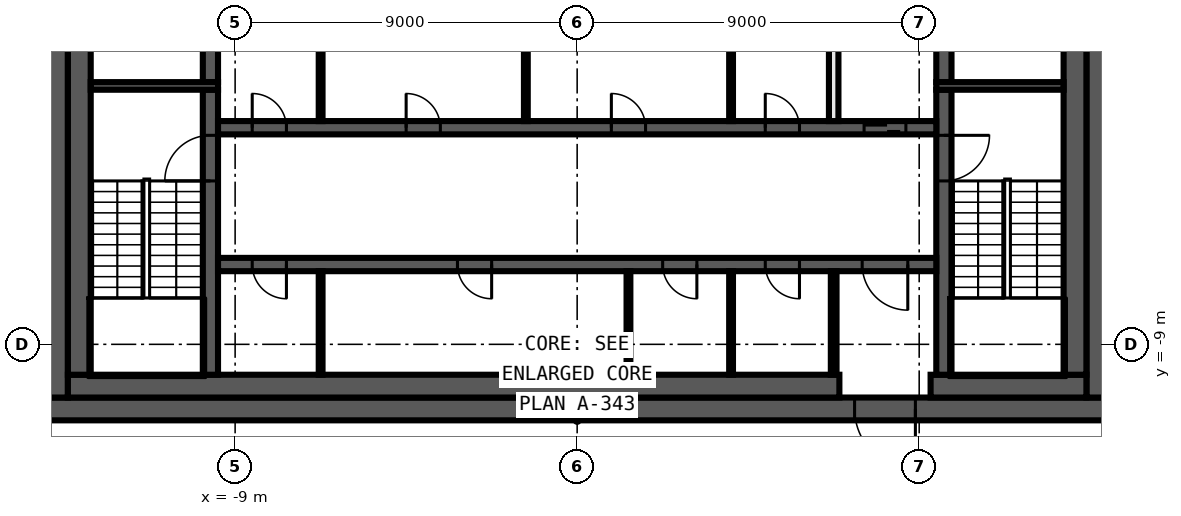
"""IFC4 building model, lengths in metres.
Left out: names, types, materials, properties, quantities, classifications, styles, units other than length and angle.
Written with IfcOpenShell. Run it as: python <this file> out.ifc"""

import sys

from ifc_helpers import new_model, si_unit, direction, frame, frame_2d, origin, place, context, subcontext, project, spatial, rectangle, extrude, element, fill, save


model = new_model("IFC4")
c1 = context("Model", 3, precision=1e-05, world=origin(), true_north=direction((0.0, 1.0)))
c2 = subcontext(c1, "Body", "Model", "MODEL_VIEW")
j1 = project(units=[si_unit("LENGTHUNIT", "METRE"), si_unit("PLANEANGLEUNIT", "RADIAN")], contexts=[c1])
p1 = place(None, origin())
s1 = spatial("IfcSite", under=j1, at=p1, CompositionType="ELEMENT")
p2 = place(p1, origin())
s2 = spatial("IfcBuilding", under=s1, at=p2, CompositionType="ELEMENT")
p3 = place(p2, frame((0.0, 0.0, 367.4)))
s3 = spatial("IfcBuildingStorey", under=s2, at=p3, CompositionType="ELEMENT", Elevation=367.4)
p4 = place(p3, frame((11.367, -20.469, 0.0), z_axis=(0.0, 0.0, 1.0), x_axis=(0.424125024155, 0.905603646131, 0.0)))
e1 = element("IfcWall", 1, at=p4, inside=s3, PredefinedType="SOLIDWALL", context=c2, shape_type="SweptSolid", body=[
    extrude(rectangle(XDim=28.801, YDim=0.25, at=frame_2d((14.401, 0.0))), origin(), (0.0, 0.0, 1.0), 3.8),
])
p5 = place(p3, frame((-11.138, 20.28, 0.0), z_axis=(0.0, 0.0, 1.0), x_axis=(-0.441342255748, -0.897338850876, 0.0)))
e2 = element("IfcWall", 2, at=p5, inside=s3, PredefinedType="SOLIDWALL", context=c2, shape_type="SweptSolid", body=[
    extrude(rectangle(XDim=28.805, YDim=0.25, at=frame_2d((14.403, 0.0))), origin(), (0.0, 0.0, 1.0), 3.8),
])
p6 = place(p3, frame((-23.851, -5.568, 0.0), z_axis=(0.0, 0.0, 1.0), x_axis=(0.701718568407, -0.712454244673, 0.0)))
e3 = element("IfcWall", 3, at=p6, inside=s3, PredefinedType="SOLIDWALL", context=c2, shape_type="SweptSolid", body=[
    extrude(rectangle(XDim=20.785, YDim=0.25, at=frame_2d((10.393, 0.0))), origin(), (0.0, 0.0, 1.0), 3.8),
])
p7 = place(p3, frame((14.0, -10.7, 0.0), z_axis=(0.0, 0.0, 1.0), x_axis=(-1.0, 0.0, 0.0)))
e4 = element("IfcWall", 4, at=p7, inside=s3, PredefinedType="SHEAR", context=c2, shape_type="SweptSolid", body=[
    extrude(rectangle(XDim=28.0, YDim=0.6, at=frame_2d((14.0, 0.0))), origin(), (0.0, 0.0, 1.0), 3.8),
])
p8 = place(p7, frame((5.1, 0.0, 0.0)))
e5 = element("IfcOpeningElement", 5, at=p8, cuts=e4, PredefinedType="OPENING", context=c2, shape_type="SweptSolid", body=[
    extrude(rectangle(XDim=1.6, YDim=2.1, at=frame_2d((0.8, 1.05))), frame((0.0, 0.31, 0.0), z_axis=(0.0, -1.0, 0.0), x_axis=(1.0, 0.0, 0.0)), (0.0, 0.0, 1.0), 0.62),
])
for number, where, z_axis, x_axis in (
    (6, (13.7, 10.4, 0.0), (0.0, 0.0, 1.0), (0.0, -1.0, 0.0)),
    (7, (-13.7, -10.4, 0.0), (0.0, 0.0, 1.0), (0.0, 1.0, 0.0)),
):
    element("IfcWall", number, at=place(p3, frame(where, z_axis=z_axis, x_axis=x_axis)), inside=s3, PredefinedType="SHEAR", context=c2, shape_type="SweptSolid", body=[
        extrude(rectangle(XDim=20.8, YDim=0.6, at=frame_2d((10.4, 0.0))), origin(), (0.0, 0.0, 1.0), 3.8),
    ])
p9 = place(p3, frame((13.4, -10.1, 0.0), z_axis=(0.0, 0.0, 1.0), x_axis=(-1.0, 0.0, 0.0)))
e8 = element("IfcWall", 8, at=p9, inside=s3, PredefinedType="SHEAR", context=c2, shape_type="SweptSolid", body=[
    extrude(rectangle(XDim=4.1, YDim=0.6, at=frame_2d((2.05, 0.0))), origin(), (0.0, 0.0, 1.0), 3.8),
])
p10 = place(p3, frame((6.9, -10.1, 0.0), z_axis=(0.0, 0.0, 1.0), x_axis=(-1.0, 0.0, 0.0)))
e9 = element("IfcWall", 9, at=p10, inside=s3, PredefinedType="SHEAR", context=c2, shape_type="SweptSolid", body=[
    extrude(rectangle(XDim=20.3, YDim=0.6, at=frame_2d((10.15, 0.0))), origin(), (0.0, 0.0, 1.0), 3.8),
])
for number, where, z_axis, x_axis in (
    (10, (13.1, 9.8, 0.0), (0.0, 0.0, 1.0), (0.0, -1.0, 0.0)),
    (11, (-13.1, -9.8, 0.0), (0.0, 0.0, 1.0), (0.0, 1.0, 0.0)),
):
    element("IfcWall", number, at=place(p3, frame(where, z_axis=z_axis, x_axis=x_axis)), inside=s3, PredefinedType="SHEAR", context=c2, shape_type="SweptSolid", body=[
        extrude(rectangle(XDim=19.6, YDim=0.6, at=frame_2d((9.8, 0.0))), origin(), (0.0, 0.0, 1.0), 3.8),
    ])
p11 = place(p3, frame((9.65, -2.3, 0.0), z_axis=(0.0, 0.0, 1.0), x_axis=(0.0, -1.0, 0.0)))
e12 = element("IfcWall", 12, at=p11, inside=s3, PredefinedType="SHEAR", context=c2, shape_type="SweptSolid", body=[
    extrude(rectangle(XDim=7.5, YDim=0.4, at=frame_2d((3.75, 0.0))), origin(), (0.0, 0.0, 1.0), 3.8),
])
p12 = place(p11, frame((1.2, 0.0, 0.0)))
e13 = element("IfcOpeningElement", 13, at=p12, cuts=e12, PredefinedType="OPENING", context=c2, shape_type="SweptSolid", body=[
    extrude(rectangle(XDim=1.2, YDim=2.1, at=frame_2d((0.6, 1.05))), frame((0.0, 0.21, 0.0), z_axis=(0.0, -1.0, 0.0), x_axis=(1.0, 0.0, 0.0)), (0.0, 0.0, 1.0), 0.42),
])
p13 = place(p3, frame((9.65, 2.1, 0.0), z_axis=(0.0, 0.0, 1.0), x_axis=(0.0, -1.0, 0.0)))
e14 = element("IfcWall", 14, at=p13, inside=s3, PredefinedType="SHEAR", context=c2, shape_type="SweptSolid", body=[
    extrude(rectangle(XDim=4.2, YDim=0.4, at=frame_2d((2.1, 0.0))), origin(), (0.0, 0.0, 1.0), 3.8),
])
p14 = place(p13, frame((0.15, 0.0, 0.0)))
e15 = element("IfcOpeningElement", 15, at=p14, cuts=e14, PredefinedType="OPENING", context=c2, shape_type="SweptSolid", body=[
    extrude(rectangle(XDim=0.9, YDim=2.1, at=frame_2d((0.45, 1.05))), frame((0.0, 0.21, 0.0), z_axis=(0.0, -1.0, 0.0), x_axis=(1.0, 0.0, 0.0)), (0.0, 0.0, 1.0), 0.42),
])
p15 = place(p3, frame((-9.65, -9.8, 0.0), z_axis=(0.0, 0.0, 1.0), x_axis=(0.0, 1.0, 0.0)))
e16 = element("IfcWall", 16, at=p15, inside=s3, PredefinedType="SHEAR", context=c2, shape_type="SweptSolid", body=[
    extrude(rectangle(XDim=7.5, YDim=0.4, at=frame_2d((3.75, 0.0))), origin(), (0.0, 0.0, 1.0), 3.8),
])
p16 = place(p15, frame((5.1, 0.0, 0.0)))
e17 = element("IfcOpeningElement", 17, at=p16, cuts=e16, PredefinedType="OPENING", context=c2, shape_type="SweptSolid", body=[
    extrude(rectangle(XDim=1.2, YDim=2.1, at=frame_2d((0.6, 1.05))), frame((0.0, 0.21, 0.0), z_axis=(0.0, -1.0, 0.0), x_axis=(1.0, 0.0, 0.0)), (0.0, 0.0, 1.0), 0.42),
])
p17 = place(p3, frame((-9.65, -2.1, 0.0), z_axis=(0.0, 0.0, 1.0), x_axis=(0.0, 1.0, 0.0)))
e18 = element("IfcWall", 18, at=p17, inside=s3, PredefinedType="SHEAR", context=c2, shape_type="SweptSolid", body=[
    extrude(rectangle(XDim=4.2, YDim=0.4, at=frame_2d((2.1, 0.0))), origin(), (0.0, 0.0, 1.0), 3.8),
])
for number, where, z_axis, x_axis in (
    (19, (9.45, -2.2, 0.0), (0.0, 0.0, 1.0), (1.0, 0.0, 0.0)),
    (20, (-9.45, -2.2, 0.0), (0.0, 0.0, 1.0), (-1.0, 0.0, 0.0)),
):
    element("IfcWall", number, at=place(p3, frame(where, z_axis=z_axis, x_axis=x_axis)), inside=s3, PredefinedType="SHEAR", context=c2, shape_type="SweptSolid", body=[
        extrude(rectangle(XDim=3.35, YDim=0.2, at=frame_2d((1.675, 0.0))), origin(), (0.0, 0.0, 1.0), 3.8),
    ])
p18 = place(p3, frame((-9.45, -3.3, 0.0), z_axis=(0.0, 0.0, 1.0), x_axis=(1.0, 0.0, 0.0)))
e21 = element("IfcWall", 21, at=p18, inside=s3, PredefinedType="SHEAR", context=c2, shape_type="SweptSolid", body=[
    extrude(rectangle(XDim=18.9, YDim=0.35, at=frame_2d((9.45, 0.0))), origin(), (0.0, 0.0, 1.0), 3.8),
])
p19 = place(p18, frame((17.0, 0.0, 0.0)))
e22 = element("IfcOpeningElement", 22, at=p19, cuts=e21, PredefinedType="OPENING", context=c2, shape_type="SweptSolid", body=[
    extrude(rectangle(XDim=1.1, YDim=2.1, at=frame_2d((0.55, 1.05))), frame((0.0, 0.185, 0.0), z_axis=(0.0, -1.0, 0.0), x_axis=(1.0, 0.0, 0.0)), (0.0, 0.0, 1.0), 0.37),
])
p20 = place(p18, frame((0.9, 0.0, 0.0)))
e23 = element("IfcOpeningElement", 23, at=p20, cuts=e21, PredefinedType="OPENING", context=c2, shape_type="SweptSolid", body=[
    extrude(rectangle(XDim=0.9, YDim=2.1, at=frame_2d((0.45, 1.05))), frame((0.0, 0.185, 0.0), z_axis=(0.0, -1.0, 0.0), x_axis=(1.0, 0.0, 0.0)), (0.0, 0.0, 1.0), 0.37),
])
p21 = place(p18, frame((4.95, 0.0, 0.0)))
e24 = element("IfcOpeningElement", 24, at=p21, cuts=e21, PredefinedType="OPENING", context=c2, shape_type="SweptSolid", body=[
    extrude(rectangle(XDim=0.9, YDim=2.1, at=frame_2d((0.45, 1.05))), frame((0.0, 0.185, 0.0), z_axis=(0.0, -1.0, 0.0), x_axis=(1.0, 0.0, 0.0)), (0.0, 0.0, 1.0), 0.37),
])
p22 = place(p18, frame((10.35, 0.0, 0.0)))
e25 = element("IfcOpeningElement", 25, at=p22, cuts=e21, PredefinedType="OPENING", context=c2, shape_type="SweptSolid", body=[
    extrude(rectangle(XDim=0.9, YDim=2.1, at=frame_2d((0.45, 1.05))), frame((0.0, 0.185, 0.0), z_axis=(0.0, -1.0, 0.0), x_axis=(1.0, 0.0, 0.0)), (0.0, 0.0, 1.0), 0.37),
])
p23 = place(p18, frame((14.4, 0.0, 0.0)))
e26 = element("IfcOpeningElement", 26, at=p23, cuts=e21, PredefinedType="OPENING", context=c2, shape_type="SweptSolid", body=[
    extrude(rectangle(XDim=0.9, YDim=2.1, at=frame_2d((0.45, 1.05))), frame((0.0, 0.185, 0.0), z_axis=(0.0, -1.0, 0.0), x_axis=(1.0, 0.0, 0.0)), (0.0, 0.0, 1.0), 0.37),
])
p24 = place(p3, frame((9.45, -6.9, 0.0), z_axis=(0.0, 0.0, 1.0), x_axis=(-1.0, 0.0, 0.0)))
e27 = element("IfcWall", 27, at=p24, inside=s3, PredefinedType="SHEAR", context=c2, shape_type="SweptSolid", body=[
    extrude(rectangle(XDim=18.9, YDim=0.35, at=frame_2d((9.45, 0.0))), origin(), (0.0, 0.0, 1.0), 3.8),
])
p25 = place(p24, frame((0.75, 0.0, 0.0)))
e28 = element("IfcOpeningElement", 28, at=p25, cuts=e27, PredefinedType="OPENING", context=c2, shape_type="SweptSolid", body=[
    extrude(rectangle(XDim=1.2, YDim=2.1, at=frame_2d((0.6, 1.05))), frame((0.0, 0.185, 0.0), z_axis=(0.0, -1.0, 0.0), x_axis=(1.0, 0.0, 0.0)), (0.0, 0.0, 1.0), 0.37),
])
p26 = place(p24, frame((17.1, 0.0, 0.0)))
e29 = element("IfcOpeningElement", 29, at=p26, cuts=e27, PredefinedType="OPENING", context=c2, shape_type="SweptSolid", body=[
    extrude(rectangle(XDim=0.9, YDim=2.1, at=frame_2d((0.45, 1.05))), frame((0.0, 0.185, 0.0), z_axis=(0.0, -1.0, 0.0), x_axis=(1.0, 0.0, 0.0)), (0.0, 0.0, 1.0), 0.37),
])
p27 = place(p24, frame((11.7, 0.0, 0.0)))
e30 = element("IfcOpeningElement", 30, at=p27, cuts=e27, PredefinedType="OPENING", context=c2, shape_type="SweptSolid", body=[
    extrude(rectangle(XDim=0.9, YDim=2.1, at=frame_2d((0.45, 1.05))), frame((0.0, 0.185, 0.0), z_axis=(0.0, -1.0, 0.0), x_axis=(1.0, 0.0, 0.0)), (0.0, 0.0, 1.0), 0.37),
])
p28 = place(p24, frame((6.3, 0.0, 0.0)))
e31 = element("IfcOpeningElement", 31, at=p28, cuts=e27, PredefinedType="OPENING", context=c2, shape_type="SweptSolid", body=[
    extrude(rectangle(XDim=0.9, YDim=2.1, at=frame_2d((0.45, 1.05))), frame((0.0, 0.185, 0.0), z_axis=(0.0, -1.0, 0.0), x_axis=(1.0, 0.0, 0.0)), (0.0, 0.0, 1.0), 0.37),
])
p29 = place(p24, frame((3.6, 0.0, 0.0)))
e32 = element("IfcOpeningElement", 32, at=p29, cuts=e27, PredefinedType="OPENING", context=c2, shape_type="SweptSolid", body=[
    extrude(rectangle(XDim=0.9, YDim=2.1, at=frame_2d((0.45, 1.05))), frame((0.0, 0.185, 0.0), z_axis=(0.0, -1.0, 0.0), x_axis=(1.0, 0.0, 0.0)), (0.0, 0.0, 1.0), 0.37),
])
p30 = place(p3, frame((6.75, -9.8, 0.0), z_axis=(0.0, 0.0, 1.0), x_axis=(0.0, 1.0, 0.0)))
e33 = element("IfcWall", 33, at=p30, inside=s3, PredefinedType="PARTITIONING", context=c2, shape_type="SweptSolid", body=[
    extrude(rectangle(XDim=2.725, YDim=0.15, at=frame_2d((1.363, 0.0))), origin(), (0.0, 0.0, 1.0), 3.8),
])
p31 = place(p3, frame((6.75, -3.125, 0.0), z_axis=(0.0, 0.0, 1.0), x_axis=(0.0, 1.0, 0.0)))
e34 = element("IfcWall", 34, at=p31, inside=s3, PredefinedType="SOLIDWALL", context=c2, shape_type="SweptSolid", body=[
    extrude(rectangle(XDim=2.725, YDim=0.25, at=frame_2d((1.363, 0.0))), origin(), (0.0, 0.0, 1.0), 3.8),
])
for number, where, z_axis, x_axis in (
    (35, (4.05, -9.8, 0.0), (0.0, 0.0, 1.0), (0.0, 1.0, 0.0)),
    (36, (4.05, -3.125, 0.0), (0.0, 0.0, 1.0), (0.0, 1.0, 0.0)),
    (37, (1.35, -9.8, 0.0), (0.0, 0.0, 1.0), (0.0, 1.0, 0.0)),
    (38, (-1.35, -3.125, 0.0), (0.0, 0.0, 1.0), (0.0, 1.0, 0.0)),
    (39, (-6.75, -9.8, 0.0), (0.0, 0.0, 1.0), (0.0, 1.0, 0.0)),
    (40, (-6.75, -3.125, 0.0), (0.0, 0.0, 1.0), (0.0, 1.0, 0.0)),
):
    element("IfcWall", number, at=place(p3, frame(where, z_axis=z_axis, x_axis=x_axis)), inside=s3, PredefinedType="PARTITIONING", context=c2, shape_type="SweptSolid", body=[
        extrude(rectangle(XDim=2.725, YDim=0.1, at=frame_2d((1.363, 0.0))), origin(), (0.0, 0.0, 1.0), 3.8),
    ])
p32 = place(p19, origin())
e41 = element("IfcDoor", 41, at=p32, inside=s3, OperationType="DOUBLE_DOOR_SLIDING", PredefinedType="DOOR", context=c2, shape_type="SweptSolid", body=[
    extrude(rectangle(XDim=1.1, YDim=2.1, at=frame_2d((0.55, 1.05))), frame((0.0, 0.025, 0.0), z_axis=(0.0, -1.0, 0.0), x_axis=(1.0, 0.0, 0.0)), (0.0, 0.0, 1.0), 0.05),
])
fill(e22, e41)
p33 = place(p8, origin())
e42 = element("IfcDoor", 42, at=p33, inside=s3, OperationType="DOUBLE_DOOR_SINGLE_SWING", PredefinedType="DOOR", context=c2, shape_type="SweptSolid", body=[
    extrude(rectangle(XDim=1.6, YDim=2.1, at=frame_2d((0.8, 1.05))), frame((0.0, 0.025, 0.0), z_axis=(0.0, -1.0, 0.0), x_axis=(1.0, 0.0, 0.0)), (0.0, 0.0, 1.0), 0.05),
])
fill(e5, e42)
p34 = place(p25, origin())
e43 = element("IfcDoor", 43, at=p34, inside=s3, OperationType="SINGLE_SWING_LEFT", PredefinedType="DOOR", context=c2, shape_type="SweptSolid", body=[
    extrude(rectangle(XDim=1.2, YDim=2.1, at=frame_2d((0.6, 1.05))), frame((0.0, 0.025, 0.0), z_axis=(0.0, -1.0, 0.0), x_axis=(1.0, 0.0, 0.0)), (0.0, 0.0, 1.0), 0.05),
])
fill(e28, e43)
p35 = place(p20, origin())
e44 = element("IfcDoor", 44, at=p35, inside=s3, OperationType="SINGLE_SWING_RIGHT", PredefinedType="DOOR", context=c2, shape_type="SweptSolid", body=[
    extrude(rectangle(XDim=0.9, YDim=2.1, at=frame_2d((0.45, 1.05))), frame((0.0, 0.025, 0.0), z_axis=(0.0, -1.0, 0.0), x_axis=(1.0, 0.0, 0.0)), (0.0, 0.0, 1.0), 0.05),
])
fill(e23, e44)
p36 = place(p21, origin())
e45 = element("IfcDoor", 45, at=p36, inside=s3, OperationType="SINGLE_SWING_LEFT", PredefinedType="DOOR", context=c2, shape_type="SweptSolid", body=[
    extrude(rectangle(XDim=0.9, YDim=2.1, at=frame_2d((0.45, 1.05))), frame((0.0, 0.025, 0.0), z_axis=(0.0, -1.0, 0.0), x_axis=(1.0, 0.0, 0.0)), (0.0, 0.0, 1.0), 0.05),
])
fill(e24, e45)
p37 = place(p22, origin())
e46 = element("IfcDoor", 46, at=p37, inside=s3, OperationType="SINGLE_SWING_RIGHT", PredefinedType="DOOR", context=c2, shape_type="SweptSolid", body=[
    extrude(rectangle(XDim=0.9, YDim=2.1, at=frame_2d((0.45, 1.05))), frame((0.0, 0.025, 0.0), z_axis=(0.0, -1.0, 0.0), x_axis=(1.0, 0.0, 0.0)), (0.0, 0.0, 1.0), 0.05),
])
fill(e25, e46)
p38 = place(p23, origin())
e47 = element("IfcDoor", 47, at=p38, inside=s3, OperationType="SINGLE_SWING_LEFT", PredefinedType="DOOR", context=c2, shape_type="SweptSolid", body=[
    extrude(rectangle(XDim=0.9, YDim=2.1, at=frame_2d((0.45, 1.05))), frame((0.0, 0.025, 0.0), z_axis=(0.0, -1.0, 0.0), x_axis=(1.0, 0.0, 0.0)), (0.0, 0.0, 1.0), 0.05),
])
fill(e26, e47)
p39 = place(p26, origin())
e48 = element("IfcDoor", 48, at=p39, inside=s3, OperationType="SINGLE_SWING_RIGHT", PredefinedType="DOOR", context=c2, shape_type="SweptSolid", body=[
    extrude(rectangle(XDim=0.9, YDim=2.1, at=frame_2d((0.45, 1.05))), frame((0.0, 0.025, 0.0), z_axis=(0.0, -1.0, 0.0), x_axis=(1.0, 0.0, 0.0)), (0.0, 0.0, 1.0), 0.05),
])
fill(e29, e48)
p40 = place(p27, origin())
e49 = element("IfcDoor", 49, at=p40, inside=s3, OperationType="SINGLE_SWING_LEFT", PredefinedType="DOOR", context=c2, shape_type="SweptSolid", body=[
    extrude(rectangle(XDim=0.9, YDim=2.1, at=frame_2d((0.45, 1.05))), frame((0.0, 0.025, 0.0), z_axis=(0.0, -1.0, 0.0), x_axis=(1.0, 0.0, 0.0)), (0.0, 0.0, 1.0), 0.05),
])
fill(e30, e49)
p41 = place(p28, origin())
e50 = element("IfcDoor", 50, at=p41, inside=s3, OperationType="SINGLE_SWING_RIGHT", PredefinedType="DOOR", context=c2, shape_type="SweptSolid", body=[
    extrude(rectangle(XDim=0.9, YDim=2.1, at=frame_2d((0.45, 1.05))), frame((0.0, 0.025, 0.0), z_axis=(0.0, -1.0, 0.0), x_axis=(1.0, 0.0, 0.0)), (0.0, 0.0, 1.0), 0.05),
])
fill(e31, e50)
p42 = place(p29, origin())
e51 = element("IfcDoor", 51, at=p42, inside=s3, OperationType="SINGLE_SWING_LEFT", PredefinedType="DOOR", context=c2, shape_type="SweptSolid", body=[
    extrude(rectangle(XDim=0.9, YDim=2.1, at=frame_2d((0.45, 1.05))), frame((0.0, 0.025, 0.0), z_axis=(0.0, -1.0, 0.0), x_axis=(1.0, 0.0, 0.0)), (0.0, 0.0, 1.0), 0.05),
])
fill(e32, e51)
p43 = place(p12, origin())
e52 = element("IfcDoor", 52, at=p43, inside=s3, OperationType="SINGLE_SWING_RIGHT", PredefinedType="DOOR", context=c2, shape_type="SweptSolid", body=[
    extrude(rectangle(XDim=1.2, YDim=2.1, at=frame_2d((0.6, 1.05))), frame((0.0, 0.025, 0.0), z_axis=(0.0, -1.0, 0.0), x_axis=(1.0, 0.0, 0.0)), (0.0, 0.0, 1.0), 0.05),
])
fill(e13, e52)
p44 = place(p16, origin())
e53 = element("IfcDoor", 53, at=p44, inside=s3, OperationType="SINGLE_SWING_LEFT", PredefinedType="DOOR", context=c2, shape_type="SweptSolid", body=[
    extrude(rectangle(XDim=1.2, YDim=2.1, at=frame_2d((0.6, 1.05))), frame((0.0, 0.025, 0.0), z_axis=(0.0, -1.0, 0.0), x_axis=(1.0, 0.0, 0.0)), (0.0, 0.0, 1.0), 0.05),
])
fill(e17, e53)
save(model, sys.argv[1])
